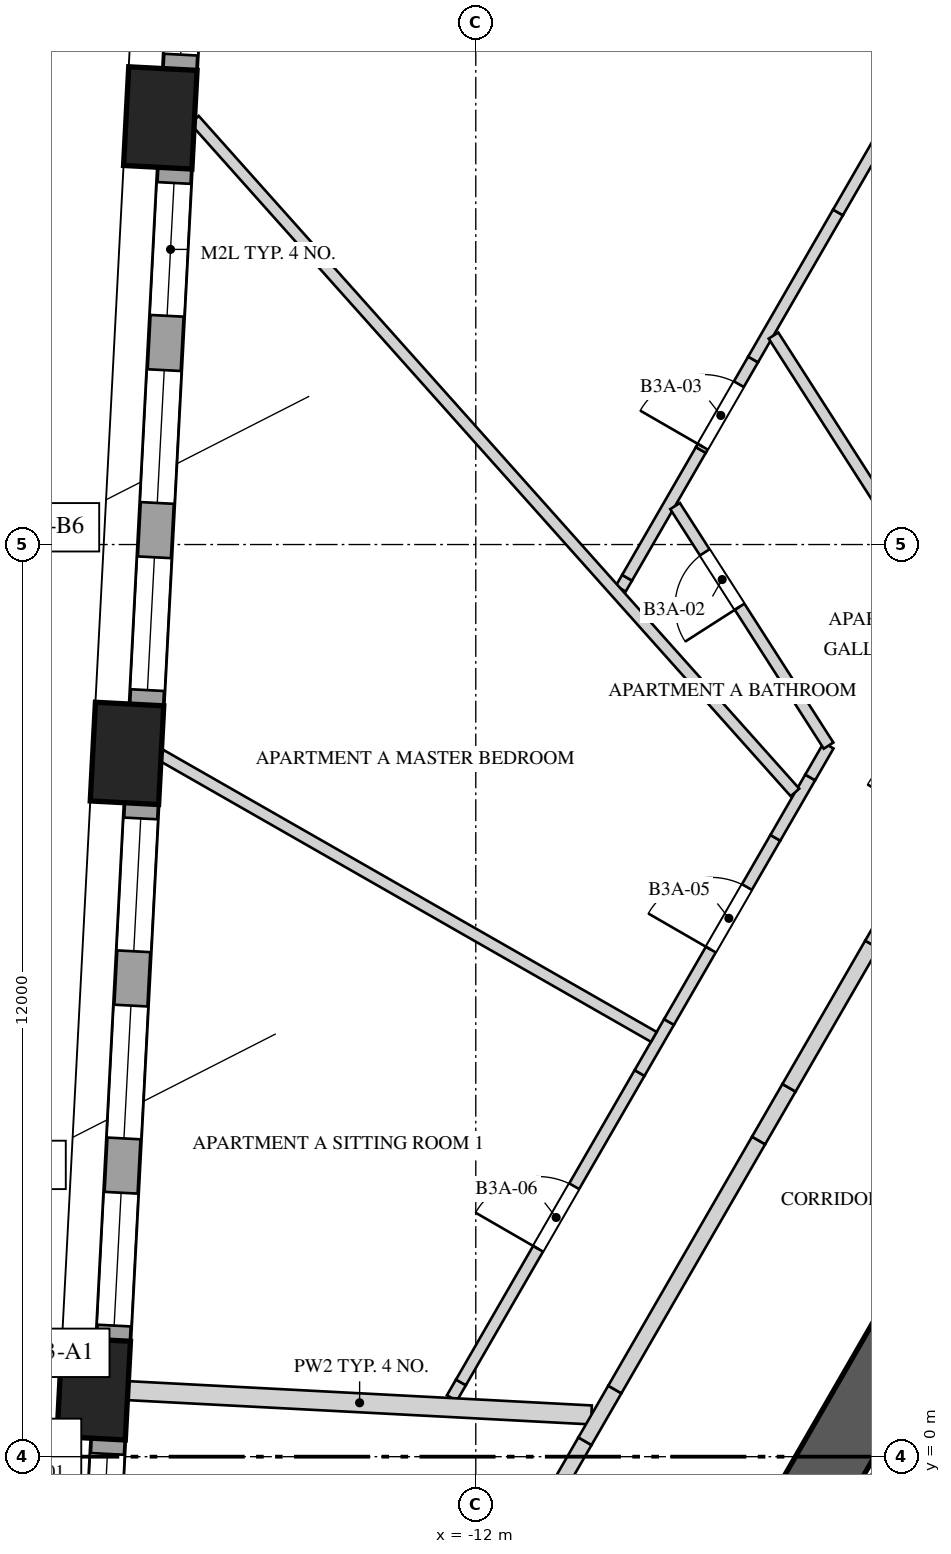
"""IFC4 building model, lengths in metres.
Left out: names, types, materials, properties, quantities, classifications, styles, units other than length and angle.
Written with IfcOpenShell. Run it as: python <this file> out.ifc"""

import sys

from ifc_helpers import new_model, si_unit, direction, frame, frame_2d, origin, origin_2d, place, context, subcontext, project, spatial, polyline, rectangle, outline, extrude, element, fill, save


model = new_model("IFC4")
c1 = context("Model", 3, precision=1e-05, world=origin(), true_north=direction((0.0, 1.0)))
c2 = subcontext(c1, "Body", "Model", "MODEL_VIEW")
j1 = project(units=[si_unit("LENGTHUNIT", "METRE"), si_unit("PLANEANGLEUNIT", "RADIAN")], contexts=[c1])
p1 = place(None, origin())
s1 = spatial("IfcSite", under=j1, at=p1, CompositionType="ELEMENT")
p2 = place(p1, origin())
s2 = spatial("IfcBuilding", under=s1, at=p2, CompositionType="ELEMENT")
p3 = place(p2, frame((0.0, 0.0, 129.6)))
s3 = spatial("IfcBuildingStorey", under=s2, at=p3, CompositionType="ELEMENT", Elevation=129.6)
p4 = place(p3, frame((-1.184, 10.55, 0.0), z_axis=(0.0, 0.0, 1.0), x_axis=(-0.500004814304, -0.866022624227, 0.0)))
e1 = element("IfcWall", 1, at=p4, inside=s3, PredefinedType="SHEAR", context=c2, shape_type="SweptSolid", body=[
    extrude(rectangle(XDim=17.09, YDim=0.9, at=frame_2d((8.545, 0.0))), origin(), (0.0, 0.0, 1.0), 4.0),
])
p5 = place(p4, frame((6.75, 0.0, 0.0)))
e2 = element("IfcOpeningElement", 2, at=p5, cuts=e1, PredefinedType="OPENING", context=c2, shape_type="SweptSolid", body=[
    extrude(rectangle(XDim=1.0, YDim=2.4, at=frame_2d((0.5, 1.2))), frame((0.0, 0.46, 0.0), z_axis=(0.0, -1.0, 0.0), x_axis=(1.0, 0.0, 0.0)), (0.0, 0.0, 1.0), 0.92),
])
p6 = place(p4, frame((14.678, 0.0, 0.0)))
e3 = element("IfcOpeningElement", 3, at=p6, cuts=e1, PredefinedType="OPENING", context=c2, shape_type="SweptSolid", body=[
    extrude(rectangle(XDim=0.8, YDim=2.1, at=frame_2d((0.4, 1.05))), frame((0.0, 0.46, 0.0), z_axis=(0.0, -1.0, 0.0), x_axis=(1.0, 0.0, 0.0)), (0.0, 0.0, 1.0), 0.92),
])
for number, where, z_axis, x_axis in (
    (4, (-16.15, 17.613, 0.0), (0.0, 0.0, 1.0), (-0.052, -0.999, 0.0)),
    (5, (-16.588, 9.252, 0.0), (0.0, 0.0, 1.0), (-0.052, -0.999, 0.0)),
    (6, (-17.027, 0.892, 0.0), (0.0, 0.0, 1.0), (-0.052, -0.999, 0.0)),
):
    element("IfcColumn", number, at=place(p3, frame(where, z_axis=z_axis, x_axis=x_axis)), inside=s3, PredefinedType="COLUMN", context=c2, shape_type="SweptSolid", body=[
        extrude(rectangle(XDim=1.3, YDim=0.9, at=origin_2d()), origin(), (0.0, 0.0, 1.0), 4.0),
    ])
p7 = place(p3, frame((-15.556, 24.663, 0.0), z_axis=(0.0, 0.0, 1.0), x_axis=(-0.052313391961, -0.998630717043, 0.0)))
e7 = element("IfcWall", 7, at=p7, inside=s3, PredefinedType="SOLIDWALL", context=c2, shape_type="SweptSolid", body=[
    extrude(rectangle(XDim=6.422, YDim=0.45, at=frame_2d((3.211, 0.0))), origin(), (0.0, 0.0, 1.0), 3.3),
])
p8 = place(p7, frame((0.195, 0.0, 0.5)))
e8 = element("IfcOpeningElement", 8, at=p8, cuts=e7, PredefinedType="OPENING", context=c2, shape_type="SweptSolid", body=[
    extrude(rectangle(XDim=1.1, YDim=2.0, at=frame_2d((0.55, 1.0))), frame((0.0, 0.235, 0.0), z_axis=(0.0, -1.0, 0.0), x_axis=(1.0, 0.0, 0.0)), (0.0, 0.0, 1.0), 0.47),
])
p9 = place(p7, frame((2.011, 0.0, 0.5)))
e9 = element("IfcOpeningElement", 9, at=p9, cuts=e7, PredefinedType="OPENING", context=c2, shape_type="SweptSolid", body=[
    extrude(rectangle(XDim=1.75, YDim=2.65, at=frame_2d((0.875, 1.325))), frame((0.0, 0.235, 0.0), z_axis=(0.0, -1.0, 0.0), x_axis=(1.0, 0.0, 0.0)), (0.0, 0.0, 1.0), 0.47),
])
p10 = place(p7, frame((4.476, 0.0, 0.5)))
e10 = element("IfcOpeningElement", 10, at=p10, cuts=e7, PredefinedType="OPENING", context=c2, shape_type="SweptSolid", body=[
    extrude(rectangle(XDim=1.75, YDim=2.65, at=frame_2d((0.875, 1.325))), frame((0.0, 0.235, 0.0), z_axis=(0.0, -1.0, 0.0), x_axis=(1.0, 0.0, 0.0)), (0.0, 0.0, 1.0), 0.47),
])
p11 = place(p3, frame((-15.96, 16.952, 0.0), z_axis=(0.0, 0.0, 1.0), x_axis=(-0.052337766399, -0.998629439887, 0.0)))
e11 = element("IfcWall", 11, at=p11, inside=s3, PredefinedType="SOLIDWALL", context=c2, shape_type="SweptSolid", body=[
    extrude(rectangle(XDim=7.072, YDim=0.45, at=frame_2d((3.536, 0.0))), origin(), (0.0, 0.0, 1.0), 3.3),
])
p12 = place(p11, frame((0.195, 0.0, 0.5)))
e12 = element("IfcOpeningElement", 12, at=p12, cuts=e11, PredefinedType="OPENING", context=c2, shape_type="SweptSolid", body=[
    extrude(rectangle(XDim=1.75, YDim=2.0, at=frame_2d((0.875, 1.0))), frame((0.0, 0.235, 0.0), z_axis=(0.0, -1.0, 0.0), x_axis=(1.0, 0.0, 0.0)), (0.0, 0.0, 1.0), 0.47),
])
p13 = place(p11, frame((2.661, 0.0, 0.5)))
e13 = element("IfcOpeningElement", 13, at=p13, cuts=e11, PredefinedType="OPENING", context=c2, shape_type="SweptSolid", body=[
    extrude(rectangle(XDim=1.75, YDim=2.65, at=frame_2d((0.875, 1.325))), frame((0.0, 0.235, 0.0), z_axis=(0.0, -1.0, 0.0), x_axis=(1.0, 0.0, 0.0)), (0.0, 0.0, 1.0), 0.47),
])
p14 = place(p11, frame((5.126, 0.0, 0.5)))
e14 = element("IfcOpeningElement", 14, at=p14, cuts=e11, PredefinedType="OPENING", context=c2, shape_type="SweptSolid", body=[
    extrude(rectangle(XDim=1.75, YDim=2.65, at=frame_2d((0.875, 1.325))), frame((0.0, 0.235, 0.0), z_axis=(0.0, -1.0, 0.0), x_axis=(1.0, 0.0, 0.0)), (0.0, 0.0, 1.0), 0.47),
])
p15 = place(p3, frame((-16.398, 8.592, 0.0), z_axis=(0.0, 0.0, 1.0), x_axis=(-0.052337766399, -0.998629439887, 0.0)))
e15 = element("IfcWall", 15, at=p15, inside=s3, PredefinedType="SOLIDWALL", context=c2, shape_type="SweptSolid", body=[
    extrude(rectangle(XDim=7.072, YDim=0.45, at=frame_2d((3.536, 0.0))), origin(), (0.0, 0.0, 1.0), 3.3),
])
p16 = place(p15, frame((0.195, 0.0, 0.5)))
e16 = element("IfcOpeningElement", 16, at=p16, cuts=e15, PredefinedType="OPENING", context=c2, shape_type="SweptSolid", body=[
    extrude(rectangle(XDim=1.75, YDim=2.65, at=frame_2d((0.875, 1.325))), frame((0.0, 0.235, 0.0), z_axis=(0.0, -1.0, 0.0), x_axis=(1.0, 0.0, 0.0)), (0.0, 0.0, 1.0), 0.47),
])
p17 = place(p15, frame((2.661, 0.0, 0.5)))
e17 = element("IfcOpeningElement", 17, at=p17, cuts=e15, PredefinedType="OPENING", context=c2, shape_type="SweptSolid", body=[
    extrude(rectangle(XDim=1.75, YDim=2.65, at=frame_2d((0.875, 1.325))), frame((0.0, 0.235, 0.0), z_axis=(0.0, -1.0, 0.0), x_axis=(1.0, 0.0, 0.0)), (0.0, 0.0, 1.0), 0.47),
])
p18 = place(p15, frame((5.126, 0.0, 0.5)))
e18 = element("IfcOpeningElement", 18, at=p18, cuts=e15, PredefinedType="OPENING", context=c2, shape_type="SweptSolid", body=[
    extrude(rectangle(XDim=1.75, YDim=2.65, at=frame_2d((0.875, 1.325))), frame((0.0, 0.235, 0.0), z_axis=(0.0, -1.0, 0.0), x_axis=(1.0, 0.0, 0.0)), (0.0, 0.0, 1.0), 0.47),
])
p19 = place(p3, frame((-16.836, 0.231, 0.0), z_axis=(0.0, 0.0, 1.0), x_axis=(-0.05234931875, -0.998628834366, 0.0)))
e19 = element("IfcWall", 19, at=p19, inside=s3, PredefinedType="SOLIDWALL", context=c2, shape_type="SweptSolid", body=[
    extrude(rectangle(XDim=2.141, YDim=0.45, at=frame_2d((1.07, 0.0))), origin(), (0.0, 0.0, 1.0), 3.3),
])
p20 = place(p19, frame((0.195, 0.0, 0.5)))
e20 = element("IfcOpeningElement", 20, at=p20, cuts=e19, PredefinedType="OPENING", context=c2, shape_type="SweptSolid", body=[
    extrude(rectangle(XDim=1.75, YDim=2.65, at=frame_2d((0.875, 1.325))), frame((0.0, 0.235, 0.0), z_axis=(0.0, -1.0, 0.0), x_axis=(1.0, 0.0, 0.0)), (0.0, 0.0, 1.0), 0.47),
])
p21 = place(p3, frame((-4.451, 3.39, 0.0), z_axis=(0.0, 0.0, 1.0), x_axis=(-0.499996545922, -0.866027397988, 0.0)))
e21 = element("IfcWall", 21, at=p21, inside=s3, PredefinedType="SOLIDWALL", context=c2, shape_type="SweptSolid", body=[
    extrude(rectangle(XDim=5.5, YDim=0.4, at=frame_2d((2.75, 0.0))), origin(), (0.0, 0.0, 1.0), 3.65),
])
p22 = place(p3, frame((-12.314, 0.771, 0.0), z_axis=(0.0, 0.0, 1.0), x_axis=(0.4996633593, 0.866219676164, 0.0)))
e22 = element("IfcWall", 22, at=p22, inside=s3, PredefinedType="PARTITIONING", context=c2, shape_type="SweptSolid", body=[
    extrude(rectangle(XDim=0.239, YDim=0.15, at=frame_2d((0.119, 0.0))), origin(), (0.0, 0.0, 1.0), 2.95),
])
p23 = place(p3, frame((-12.195, 0.977, 0.0), z_axis=(0.0, 0.0, 1.0), x_axis=(0.499993726502, 0.86602902576, 0.0)))
e23 = element("IfcWall", 23, at=p23, inside=s3, PredefinedType="PARTITIONING", context=c2, shape_type="SweptSolid", body=[
    extrude(rectangle(XDim=4.7, YDim=0.15, at=frame_2d((2.35, 0.0))), origin(), (0.0, 0.0, 1.0), 3.65),
])
p24 = place(p23, frame((2.03, 0.0, 0.0)))
e24 = element("IfcOpeningElement", 24, at=p24, cuts=e23, PredefinedType="OPENING", context=c2, shape_type="SweptSolid", body=[
    extrude(rectangle(XDim=0.95, YDim=2.4, at=frame_2d((0.475, 1.2))), frame((0.0, 0.085, 0.0), z_axis=(0.0, -1.0, 0.0), x_axis=(1.0, 0.0, 0.0)), (0.0, 0.0, 1.0), 0.17),
])
p25 = place(p3, frame((-9.845, 5.048, 0.0), z_axis=(0.0, 0.0, 1.0), x_axis=(0.499967891604, 0.866043940782, 0.0)))
e25 = element("IfcWall", 25, at=p25, inside=s3, PredefinedType="PARTITIONING", context=c2, shape_type="SweptSolid", body=[
    extrude(rectangle(XDim=0.775, YDim=0.15, at=frame_2d((0.387, 0.0))), origin(), (0.0, 0.0, 1.0), 2.75),
])
p26 = place(p3, frame((-9.458, 5.719, 0.0), z_axis=(0.0, 0.0, 1.0), x_axis=(0.499996941814, 0.866027169422, 0.0)))
e26 = element("IfcWall", 26, at=p26, inside=s3, PredefinedType="PARTITIONING", context=c2, shape_type="SweptSolid", body=[
    extrude(rectangle(XDim=2.797, YDim=0.15, at=frame_2d((1.399, 0.0))), origin(), (0.0, 0.0, 1.0), 3.65),
])
p27 = place(p26, frame((1.1, 0.0, 0.0)))
e27 = element("IfcOpeningElement", 27, at=p27, cuts=e26, PredefinedType="OPENING", context=c2, shape_type="SweptSolid", body=[
    extrude(rectangle(XDim=0.95, YDim=2.4, at=frame_2d((0.475, 1.2))), frame((0.0, 0.085, 0.0), z_axis=(0.0, -1.0, 0.0), x_axis=(1.0, 0.0, 0.0)), (0.0, 0.0, 1.0), 0.17),
])
p28 = place(p3, frame((-8.059, 8.141, 0.0), z_axis=(0.0, 0.0, 1.0), x_axis=(0.500060322201, 0.865990573944, 0.0)))
e28 = element("IfcWall", 28, at=p28, inside=s3, PredefinedType="PARTITIONING", context=c2, shape_type="SweptSolid", body=[
    extrude(rectangle(XDim=0.917, YDim=0.15, at=frame_2d((0.459, 0.0))), origin(), (0.0, 0.0, 1.0), 2.55),
])
p29 = place(p3, frame((-7.6, 8.936, 0.0), z_axis=(0.0, 0.0, 1.0), x_axis=(0.499941024108, 0.866059450854, 0.0)))
e29 = element("IfcWall", 29, at=p29, inside=s3, PredefinedType="PARTITIONING", context=c2, shape_type="SweptSolid", body=[
    extrude(rectangle(XDim=0.483, YDim=0.15, at=frame_2d((0.242, 0.0))), origin(), (0.0, 0.0, 1.0), 3.65),
])
p30 = place(p3, frame((-10.479, 0.549, 0.0), z_axis=(0.0, 0.0, 1.0), x_axis=(-0.998629511984, 0.052336390727, 0.0)))
e30 = element("IfcWall", 30, at=p30, inside=s3, PredefinedType="SOLIDWALL", context=c2, shape_type="SweptSolid", body=[
    extrude(rectangle(XDim=6.106, YDim=0.25, at=frame_2d((3.053, 0.0))), origin(), (0.0, 0.0, 1.0), 2.95),
])
p31 = place(p3, frame((-10.093, 11.419, 0.0), z_axis=(0.0, 0.0, 1.0), x_axis=(0.500399834964, 0.865794435861, 0.0)))
e31 = element("IfcWall", 31, at=p31, inside=s3, PredefinedType="PARTITIONING", context=c2, shape_type="SweptSolid", body=[
    extrude(rectangle(XDim=0.166, YDim=0.15, at=frame_2d((0.083, 0.0))), origin(), (0.0, 0.0, 1.0), 2.55),
])
p32 = place(p3, frame((-10.01, 11.563, 0.0), z_axis=(0.0, 0.0, 1.0), x_axis=(0.499994660107, 0.866028486751, 0.0)))
e32 = element("IfcWall", 32, at=p32, inside=s3, PredefinedType="PARTITIONING", context=c2, shape_type="SweptSolid", body=[
    extrude(rectangle(XDim=1.941, YDim=0.15, at=frame_2d((0.97, 0.0))), origin(), (0.0, 0.0, 1.0), 3.65),
])
p33 = place(p3, frame((-9.039, 13.244, 0.0), z_axis=(0.0, 0.0, 1.0), x_axis=(0.499978698016, 0.866037702141, 0.0)))
e33 = element("IfcWall", 33, at=p33, inside=s3, PredefinedType="PARTITIONING", context=c2, shape_type="SweptSolid", body=[
    extrude(outline(polyline([(0.0, 0.0), (1.375, 0.0), (1.375, 2.55), (0.38, 2.55), (0.38, 3.65), (0.0, 3.65), (0.0, 0.0)])), frame((0.0, 0.075, 0.0), z_axis=(0.0, -1.0, 0.0), x_axis=(1.0, 0.0, 0.0)), (0.0, 0.0, 1.0), 0.15),
])
p34 = place(p33, frame((0.05, 0.0, 0.0)))
e34 = element("IfcOpeningElement", 34, at=p34, cuts=e33, PredefinedType="OPENING", context=c2, shape_type="SweptSolid", body=[
    extrude(rectangle(XDim=0.95, YDim=2.4, at=frame_2d((0.475, 1.2))), frame((0.0, 0.085, 0.0), z_axis=(0.0, -1.0, 0.0), x_axis=(1.0, 0.0, 0.0)), (0.0, 0.0, 1.0), 0.17),
])
p35 = place(p3, frame((-8.352, 14.434, 0.0), z_axis=(0.0, 0.0, 1.0), x_axis=(0.500040905051, 0.866001785954, 0.0)))
e35 = element("IfcWall", 35, at=p35, inside=s3, PredefinedType="PARTITIONING", context=c2, shape_type="SweptSolid", body=[
    extrude(rectangle(XDim=2.234, YDim=0.15, at=frame_2d((1.117, 0.0))), origin(), (0.0, 0.0, 1.0), 3.65),
])
p36 = place(p3, frame((-7.235, 16.369, 0.0), z_axis=(0.0, 0.0, 1.0), x_axis=(0.499850094852, 0.866111934265, 0.0)))
e36 = element("IfcWall", 36, at=p36, inside=s3, PredefinedType="PARTITIONING", context=c2, shape_type="SweptSolid", body=[
    extrude(rectangle(XDim=1.104, YDim=0.15, at=frame_2d((0.552, 0.0))), origin(), (0.0, 0.0, 1.0), 2.55),
])
p37 = place(p3, frame((-9.658, 5.522, 0.0), z_axis=(0.0, 0.0, 1.0), x_axis=(-0.868078092768, 0.496427663267, 0.0)))
e37 = element("IfcWall", 37, at=p37, inside=s3, PredefinedType="PARTITIONING", context=c2, shape_type="SweptSolid", body=[
    extrude(rectangle(XDim=7.467, YDim=0.15, at=frame_2d((3.733, 0.0))), origin(), (0.0, 0.0, 1.0), 2.75),
])
p38 = place(p3, frame((-8.083, 14.749, 0.0), z_axis=(0.0, 0.0, 1.0), x_axis=(0.539468172068, -0.842005992452, 0.0)))
e38 = element("IfcWall", 38, at=p38, inside=s3, PredefinedType="PARTITIONING", context=c2, shape_type="SweptSolid", body=[
    extrude(rectangle(XDim=3.744, YDim=0.15, at=frame_2d((1.872, 0.0))), origin(), (0.0, 0.0, 1.0), 3.65),
])
p39 = place(p3, frame((-7.801, 8.739, 0.0), z_axis=(0.0, 0.0, 1.0), x_axis=(-0.665934790779, 0.746009955986, 0.0)))
e39 = element("IfcWall", 39, at=p39, inside=s3, PredefinedType="PARTITIONING", context=c2, shape_type="SweptSolid", body=[
    extrude(rectangle(XDim=11.863, YDim=0.15, at=frame_2d((5.932, 0.0))), origin(), (0.0, 0.0, 1.0), 2.55),
])
p40 = place(p3, frame((-7.359, 9.354, 0.0), z_axis=(0.0, 0.0, 1.0), x_axis=(-0.539468172068, 0.842005992452, 0.0)))
e40 = element("IfcWall", 40, at=p40, inside=s3, PredefinedType="PARTITIONING", context=c2, shape_type="SweptSolid", body=[
    extrude(rectangle(XDim=3.744, YDim=0.15, at=frame_2d((1.872, 0.0))), origin(), (0.0, 0.0, 1.0), 3.65),
])
p41 = place(p40, frame((2.17, 0.0, 0.0)))
e41 = element("IfcOpeningElement", 41, at=p41, cuts=e40, PredefinedType="OPENING", context=c2, shape_type="SweptSolid", body=[
    extrude(rectangle(XDim=0.85, YDim=2.4, at=frame_2d((0.425, 1.2))), frame((0.0, 0.085, 0.0), z_axis=(0.0, -1.0, 0.0), x_axis=(1.0, 0.0, 0.0)), (0.0, 0.0, 1.0), 0.17),
])
p42 = place(p3, frame((-13.135, -4.25, 0.0), z_axis=(0.0, 0.0, 1.0), x_axis=(0.50000466804, 0.866022708674, 0.0)))
e42 = element("IfcWall", 42, at=p42, inside=s3, PredefinedType="SOLIDWALL", context=c2, shape_type="SweptSolid", body=[
    extrude(rectangle(XDim=5.142, YDim=0.2, at=frame_2d((2.571, 0.0))), origin(), (0.0, 0.0, 1.0), 3.65),
])
p43 = place(p3, frame((-10.564, 0.203, 0.0), z_axis=(0.0, 0.0, 1.0), x_axis=(0.499982474044, 0.866035522163, 0.0)))
e43 = element("IfcWall", 43, at=p43, inside=s3, PredefinedType="SOLIDWALL", context=c2, shape_type="SweptSolid", body=[
    extrude(rectangle(XDim=0.786, YDim=0.2, at=frame_2d((0.393, 0.0))), origin(), (0.0, 0.0, 1.0), 2.95),
])
p44 = place(p3, frame((-10.171, 0.884, 0.0), z_axis=(0.0, 0.0, 1.0), x_axis=(0.499998034377, 0.866026538634, 0.0)))
e44 = element("IfcWall", 44, at=p44, inside=s3, PredefinedType="SOLIDWALL", context=c2, shape_type="SweptSolid", body=[
    extrude(rectangle(XDim=3.783, YDim=0.2, at=frame_2d((1.892, 0.0))), origin(), (0.0, 0.0, 1.0), 3.65),
])
p45 = place(p3, frame((-8.279, 4.16, 0.0), z_axis=(0.0, 0.0, 1.0), x_axis=(0.500109828528, 0.865961984968, 0.0)))
e45 = element("IfcWall", 45, at=p45, inside=s3, PredefinedType="SOLIDWALL", context=c2, shape_type="SweptSolid", body=[
    extrude(rectangle(XDim=0.8, YDim=0.2, at=frame_2d((0.4, 0.0))), origin(), (0.0, 0.0, 1.0), 2.75),
])
p46 = place(p3, frame((-7.879, 4.853, 0.0), z_axis=(0.0, 0.0, 1.0), x_axis=(0.499948868167, 0.866054922749, 0.0)))
e46 = element("IfcWall", 46, at=p46, inside=s3, PredefinedType="SOLIDWALL", context=c2, shape_type="SweptSolid", body=[
    extrude(rectangle(XDim=2.178, YDim=0.2, at=frame_2d((1.089, 0.0))), origin(), (0.0, 0.0, 1.0), 3.65),
])
p47 = place(p3, frame((-6.79, 6.739, 0.0), z_axis=(0.0, 0.0, 1.0), x_axis=(0.500118100521, 0.865957207679, 0.0)))
e47 = element("IfcWall", 47, at=p47, inside=s3, PredefinedType="SOLIDWALL", context=c2, shape_type="SweptSolid", body=[
    extrude(rectangle(XDim=0.944, YDim=0.2, at=frame_2d((0.472, 0.0))), origin(), (0.0, 0.0, 1.0), 2.55),
])
p48 = place(p10, origin())
e48 = element("IfcWindow", 48, at=p48, inside=s3, PartitioningType="SINGLE_PANEL", PredefinedType="WINDOW", context=c2, shape_type="SweptSolid", body=[
    extrude(rectangle(XDim=1.75, YDim=2.65, at=frame_2d((0.875, 1.325))), frame((0.0, 0.03, 0.0), z_axis=(0.0, -1.0, 0.0), x_axis=(1.0, 0.0, 0.0)), (0.0, 0.0, 1.0), 0.06),
])
fill(e10, e48)
p49 = place(p12, origin())
e49 = element("IfcWindow", 49, at=p49, inside=s3, PartitioningType="SINGLE_PANEL", PredefinedType="WINDOW", context=c2, shape_type="SweptSolid", body=[
    extrude(rectangle(XDim=1.75, YDim=2.0, at=frame_2d((0.875, 1.0))), frame((0.0, 0.03, 0.0), z_axis=(0.0, -1.0, 0.0), x_axis=(1.0, 0.0, 0.0)), (0.0, 0.0, 1.0), 0.06),
])
fill(e12, e49)
p50 = place(p13, origin())
e50 = element("IfcWindow", 50, at=p50, inside=s3, PartitioningType="SINGLE_PANEL", PredefinedType="WINDOW", context=c2, shape_type="SweptSolid", body=[
    extrude(rectangle(XDim=1.75, YDim=2.65, at=frame_2d((0.875, 1.325))), frame((0.0, 0.03, 0.0), z_axis=(0.0, -1.0, 0.0), x_axis=(1.0, 0.0, 0.0)), (0.0, 0.0, 1.0), 0.06),
])
fill(e13, e50)
p51 = place(p14, origin())
e51 = element("IfcWindow", 51, at=p51, inside=s3, PartitioningType="SINGLE_PANEL", PredefinedType="WINDOW", context=c2, shape_type="SweptSolid", body=[
    extrude(rectangle(XDim=1.75, YDim=2.65, at=frame_2d((0.875, 1.325))), frame((0.0, 0.03, 0.0), z_axis=(0.0, -1.0, 0.0), x_axis=(1.0, 0.0, 0.0)), (0.0, 0.0, 1.0), 0.06),
])
fill(e14, e51)
p52 = place(p16, origin())
e52 = element("IfcWindow", 52, at=p52, inside=s3, PartitioningType="SINGLE_PANEL", PredefinedType="WINDOW", context=c2, shape_type="SweptSolid", body=[
    extrude(rectangle(XDim=1.75, YDim=2.65, at=frame_2d((0.875, 1.325))), frame((0.0, 0.03, 0.0), z_axis=(0.0, -1.0, 0.0), x_axis=(1.0, 0.0, 0.0)), (0.0, 0.0, 1.0), 0.06),
])
fill(e16, e52)
p53 = place(p17, origin())
e53 = element("IfcWindow", 53, at=p53, inside=s3, PartitioningType="SINGLE_PANEL", PredefinedType="WINDOW", context=c2, shape_type="SweptSolid", body=[
    extrude(rectangle(XDim=1.75, YDim=2.65, at=frame_2d((0.875, 1.325))), frame((0.0, 0.03, 0.0), z_axis=(0.0, -1.0, 0.0), x_axis=(1.0, 0.0, 0.0)), (0.0, 0.0, 1.0), 0.06),
])
fill(e17, e53)
p54 = place(p18, origin())
e54 = element("IfcWindow", 54, at=p54, inside=s3, PartitioningType="SINGLE_PANEL", PredefinedType="WINDOW", context=c2, shape_type="SweptSolid", body=[
    extrude(rectangle(XDim=1.75, YDim=2.65, at=frame_2d((0.875, 1.325))), frame((0.0, 0.03, 0.0), z_axis=(0.0, -1.0, 0.0), x_axis=(1.0, 0.0, 0.0)), (0.0, 0.0, 1.0), 0.06),
])
fill(e18, e54)
p55 = place(p20, origin())
e55 = element("IfcWindow", 55, at=p55, inside=s3, PartitioningType="SINGLE_PANEL", PredefinedType="WINDOW", context=c2, shape_type="SweptSolid", body=[
    extrude(rectangle(XDim=1.75, YDim=2.65, at=frame_2d((0.875, 1.325))), frame((0.0, 0.03, 0.0), z_axis=(0.0, -1.0, 0.0), x_axis=(1.0, 0.0, 0.0)), (0.0, 0.0, 1.0), 0.06),
])
fill(e20, e55)
p56 = place(p41, origin())
e56 = element("IfcDoor", 56, at=p56, inside=s3, OperationType="SINGLE_SWING_RIGHT", PredefinedType="DOOR", context=c2, shape_type="SweptSolid", body=[
    extrude(rectangle(XDim=0.85, YDim=2.4, at=frame_2d((0.425, 1.2))), frame((0.0, 0.025, 0.0), z_axis=(0.0, -1.0, 0.0), x_axis=(1.0, 0.0, 0.0)), (0.0, 0.0, 1.0), 0.05),
])
fill(e41, e56)
p57 = place(p34, origin())
e57 = element("IfcDoor", 57, at=p57, inside=s3, OperationType="SINGLE_SWING_LEFT", PredefinedType="DOOR", context=c2, shape_type="SweptSolid", body=[
    extrude(rectangle(XDim=0.95, YDim=2.4, at=frame_2d((0.475, 1.2))), frame((0.0, 0.025, 0.0), z_axis=(0.0, -1.0, 0.0), x_axis=(1.0, 0.0, 0.0)), (0.0, 0.0, 1.0), 0.05),
])
fill(e34, e57)
p58 = place(p27, origin())
e58 = element("IfcDoor", 58, at=p58, inside=s3, OperationType="SINGLE_SWING_LEFT", PredefinedType="DOOR", context=c2, shape_type="SweptSolid", body=[
    extrude(rectangle(XDim=0.95, YDim=2.4, at=frame_2d((0.475, 1.2))), frame((0.0, 0.025, 0.0), z_axis=(0.0, -1.0, 0.0), x_axis=(1.0, 0.0, 0.0)), (0.0, 0.0, 1.0), 0.05),
])
fill(e27, e58)
p59 = place(p24, origin())
e59 = element("IfcDoor", 59, at=p59, inside=s3, OperationType="SINGLE_SWING_RIGHT", PredefinedType="DOOR", context=c2, shape_type="SweptSolid", body=[
    extrude(rectangle(XDim=0.95, YDim=2.4, at=frame_2d((0.475, 1.2))), frame((0.0, 0.025, 0.0), z_axis=(0.0, -1.0, 0.0), x_axis=(1.0, 0.0, 0.0)), (0.0, 0.0, 1.0), 0.05),
])
fill(e24, e59)
save(model, sys.argv[1])
